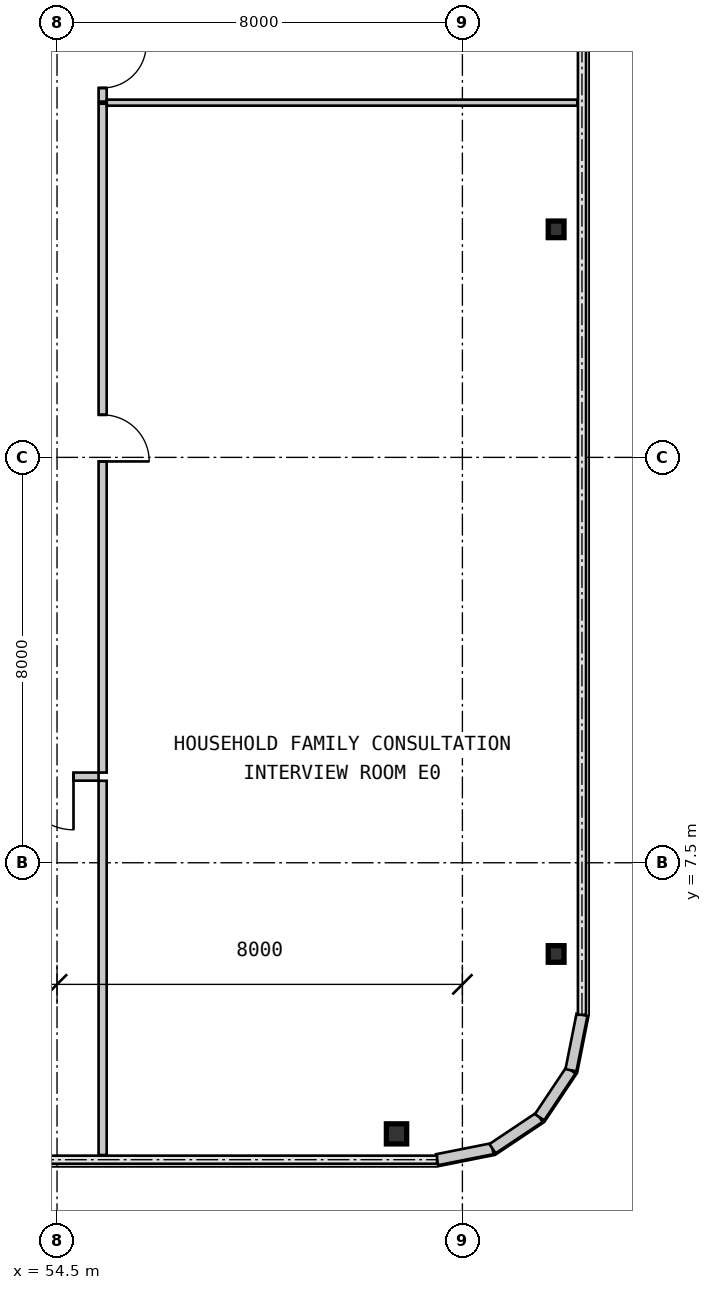
"""IFC4 building model, lengths in metres.
Left out: names, types, materials, properties, quantities, classifications, styles, units other than length and angle.
Written with IfcOpenShell. Run it as: python <this file> out.ifc"""

import sys

from ifc_helpers import new_model, si_unit, direction, frame, frame_2d, origin, origin_2d, place, context, subcontext, project, spatial, rectangle, i_section, extrude, source, transform, mapped, element, fill, save


model = new_model("IFC4")
c1 = context("Model", 3, precision=1e-05, world=origin(), true_north=direction((0.0, 1.0)))
c2 = subcontext(c1, "Body", "Model", "MODEL_VIEW")
j1 = project(units=[si_unit("LENGTHUNIT", "METRE"), si_unit("PLANEANGLEUNIT", "RADIAN")], contexts=[c1])
p1 = place(None, origin())
s1 = spatial("IfcSite", under=j1, at=p1, CompositionType="ELEMENT")
p2 = place(p1, origin())
s2 = spatial("IfcBuilding", under=s1, at=p2, CompositionType="ELEMENT")
p3 = place(p2, frame((0.0, 0.0, 32.55)))
s3 = spatial("IfcBuildingStorey", under=s2, at=p3, CompositionType="ELEMENT", Elevation=32.55)
m1 = source(origin(), c2, "Body", "SweptSolid", [
    extrude(i_section(OverallWidth=0.4, OverallDepth=0.396, WebThickness=0.022, FlangeThickness=0.034, at=origin_2d()), origin(), (0.0, 0.0, 1.0), 3.15),
])
p4 = place(p3, frame((61.2, 2.15, 0.0), z_axis=(0.0, 0.0, 1.0), x_axis=(1.0, 0.0, 0.0)))
e1 = element("IfcColumn", 1, at=p4, inside=s3, PredefinedType="COLUMN", context=c2, shape_type="MappedRepresentation", body=[
    mapped(m1, transform((0.0, 0.0, 0.0), scale=1.0)),
])
m2 = source(origin(), c2, "Body", "SweptSolid", [
    extrude(i_section(OverallWidth=0.311, OverallDepth=0.327, WebThickness=0.016, FlangeThickness=0.025, at=origin_2d()), origin(), (0.0, 0.0, 1.0), 3.15),
])
for number, where, z_axis, x_axis in (
    (2, (64.35, 5.7, 0.0), (0.0, 0.0, 1.0), (1.0, 0.0, 0.0)),
    (3, (64.35, 20.0, 0.0), (0.0, 0.0, 1.0), (1.0, 0.0, 0.0)),
):
    element("IfcColumn", number, at=place(p3, frame(where, z_axis=z_axis, x_axis=x_axis)), inside=s3, PredefinedType="COLUMN", context=c2, shape_type="MappedRepresentation", body=[
        mapped(m2, transform((0.0, 0.0, 0.0), scale=1.0)),
    ])
m3 = source(origin(), c2, "Body", "SweptSolid", [
    extrude(rectangle(XDim=1.116, YDim=0.22, at=frame_2d((0.558, 0.0))), origin(), (0.0, 0.0, 1.0), 2.93),
])
for number, where, z_axis, x_axis in (
    (4, (62.0, 1.64, 0.0), (0.0, 0.0, 1.0), (0.981, 0.195, 0.0)),
    (5, (63.094, 1.858, 0.0), (0.0, 0.0, 1.0), (0.831, 0.556, 0.0)),
    (6, (64.022, 2.478, 0.0), (0.0, 0.0, 1.0), (0.556, 0.831, 0.0)),
    (7, (64.642, 3.406, 0.0), (0.0, 0.0, 1.0), (0.195, 0.981, 0.0)),
):
    element("IfcWall", number, at=place(p3, frame(where, z_axis=z_axis, x_axis=x_axis)), inside=s3, PredefinedType="SOLIDWALL", context=c2, shape_type="MappedRepresentation", body=[
        mapped(m3, transform((0.0, 0.0, 0.0), scale=1.0)),
    ])
m4 = source(origin(), c2, "Body", "SweptSolid", [
    extrude(rectangle(XDim=2.04, YDim=0.16, at=frame_2d((1.02, 0.0))), origin(), (0.0, 0.0, 1.0), 2.93),
])
p5 = place(p3, frame((55.32, 9.2, 0.0), z_axis=(0.0, 0.0, 1.0), x_axis=(-1.0, 0.0, 0.0)))
e8 = element("IfcWall", 8, at=p5, inside=s3, PredefinedType="PARTITIONING", context=c2, shape_type="MappedRepresentation", body=[
    mapped(m4, transform((0.0, 0.0, 0.0), scale=1.0)),
])
m5 = source(origin(), c2, "Body", "SweptSolid", [
    extrude(rectangle(XDim=1.05, YDim=2.1, at=frame_2d((0.525, 1.05))), frame((0.0, 0.09, 0.0), z_axis=(0.0, -1.0, 0.0), x_axis=(1.0, 0.0, 0.0)), (0.0, 0.0, 1.0), 0.18),
])
p6 = place(p5, frame((0.495, 0.0, 0.0)))
e9 = element("IfcOpeningElement", 9, at=p6, cuts=e8, PredefinedType="OPENING", context=c2, shape_type="MappedRepresentation", body=[
    mapped(m5, transform((0.0, 0.0, 0.0), scale=1.0)),
])
m6 = source(origin(), c2, "Body", "SweptSolid", [
    extrude(rectangle(XDim=13.2, YDim=0.16, at=frame_2d((6.6, 0.0))), origin(), (0.0, 0.0, 1.0), 2.93),
])
p7 = place(p3, frame((55.4, 22.48, 0.0), z_axis=(0.0, 0.0, 1.0), x_axis=(0.0, -1.0, 0.0)))
e10 = element("IfcWall", 10, at=p7, inside=s3, PredefinedType="PARTITIONING", context=c2, shape_type="MappedRepresentation", body=[
    mapped(m6, transform((0.0, 0.0, 0.0), scale=1.0)),
])
m7 = source(origin(), c2, "Body", "SweptSolid", [
    extrude(rectangle(XDim=0.92, YDim=2.1, at=frame_2d((0.46, 1.05))), frame((0.0, 0.09, 0.0), z_axis=(0.0, -1.0, 0.0), x_axis=(1.0, 0.0, 0.0)), (0.0, 0.0, 1.0), 0.18),
])
p8 = place(p7, frame((6.14, 0.0, 0.0)))
e11 = element("IfcOpeningElement", 11, at=p8, cuts=e10, PredefinedType="OPENING", context=c2, shape_type="MappedRepresentation", body=[
    mapped(m7, transform((0.0, 0.0, 0.0), scale=1.0)),
])
m8 = source(origin(), c2, "Body", "SweptSolid", [
    extrude(rectangle(XDim=1.4, YDim=0.16, at=frame_2d((0.7, 0.0))), origin(), (0.0, 0.0, 1.0), 2.93),
])
p9 = place(p3, frame((55.4, 23.92, 0.0), z_axis=(0.0, 0.0, 1.0), x_axis=(0.0, -1.0, 0.0)))
e12 = element("IfcWall", 12, at=p9, inside=s3, PredefinedType="PARTITIONING", context=c2, shape_type="MappedRepresentation", body=[
    mapped(m8, transform((0.0, 0.0, 0.0), scale=1.0)),
])
m9 = source(origin(), c2, "Body", "SweptSolid", [
    extrude(rectangle(XDim=0.86, YDim=2.1, at=frame_2d((0.43, 1.05))), frame((0.0, 0.09, 0.0), z_axis=(0.0, -1.0, 0.0), x_axis=(1.0, 0.0, 0.0)), (0.0, 0.0, 1.0), 0.18),
])
p10 = place(p9, frame((0.27, 0.0, 0.0)))
e13 = element("IfcOpeningElement", 13, at=p10, cuts=e12, PredefinedType="OPENING", context=c2, shape_type="MappedRepresentation", body=[
    mapped(m9, transform((0.0, 0.0, 0.0), scale=1.0)),
])
m10 = source(origin(), c2, "Body", "SweptSolid", [
    extrude(rectangle(XDim=7.386, YDim=0.16, at=frame_2d((3.693, 0.0))), origin(), (0.0, 0.0, 1.0), 2.93),
])
p11 = place(p3, frame((55.4, 9.118, 0.0), z_axis=(0.0, 0.0, 1.0), x_axis=(0.0, -1.0, 0.0)))
e14 = element("IfcWall", 14, at=p11, inside=s3, PredefinedType="PARTITIONING", context=c2, shape_type="MappedRepresentation", body=[
    mapped(m10, transform((0.0, 0.0, 0.0), scale=1.0)),
])
m11 = source(origin(), c2, "Body", "SweptSolid", [
    extrude(rectangle(XDim=9.286, YDim=0.12, at=frame_2d((4.643, 0.0))), origin(), (0.0, 0.0, 1.0), 2.93),
])
p12 = place(p3, frame((55.482, 22.5, 0.0), z_axis=(0.0, 0.0, 1.0), x_axis=(1.0, 0.0, 0.0)))
e15 = element("IfcWall", 15, at=p12, inside=s3, PredefinedType="PARTITIONING", context=c2, shape_type="MappedRepresentation", body=[
    mapped(m11, transform((0.0, 0.0, 0.0), scale=1.0)),
])
m12 = source(origin(), c2, "Body", "SweptSolid", [
    extrude(rectangle(XDim=1.05, YDim=2.1, at=frame_2d((0.525, 1.05))), frame((0.0, 0.025, 0.0), z_axis=(0.0, -1.0, 0.0), x_axis=(1.0, 0.0, 0.0)), (0.0, 0.0, 1.0), 0.05),
])
p13 = place(p6, origin())
e16 = element("IfcDoor", 16, at=p13, inside=s3, OperationType="SINGLE_SWING_LEFT", PredefinedType="DOOR", context=c2, shape_type="MappedRepresentation", body=[
    mapped(m12, transform((0.0, 0.0, 0.0), scale=1.0)),
])
fill(e9, e16)
m13 = source(origin(), c2, "Body", "SweptSolid", [
    extrude(rectangle(XDim=0.92, YDim=2.1, at=frame_2d((0.46, 1.05))), frame((0.0, 0.025, 0.0), z_axis=(0.0, -1.0, 0.0), x_axis=(1.0, 0.0, 0.0)), (0.0, 0.0, 1.0), 0.05),
])
p14 = place(p8, origin())
e17 = element("IfcDoor", 17, at=p14, inside=s3, OperationType="SINGLE_SWING_RIGHT", PredefinedType="DOOR", context=c2, shape_type="MappedRepresentation", body=[
    mapped(m13, transform((0.0, 0.0, 0.0), scale=1.0)),
])
fill(e11, e17)
m14 = source(origin(), c2, "Body", "SweptSolid", [
    extrude(rectangle(XDim=0.86, YDim=2.1, at=frame_2d((0.43, 1.05))), frame((0.0, 0.025, 0.0), z_axis=(0.0, -1.0, 0.0), x_axis=(1.0, 0.0, 0.0)), (0.0, 0.0, 1.0), 0.05),
])
p15 = place(p10, origin())
e18 = element("IfcDoor", 18, at=p15, inside=s3, OperationType="SINGLE_SWING_LEFT", PredefinedType="DOOR", context=c2, shape_type="MappedRepresentation", body=[
    mapped(m14, transform((0.0, 0.0, 0.0), scale=1.0)),
])
fill(e13, e18)
save(model, sys.argv[1])
